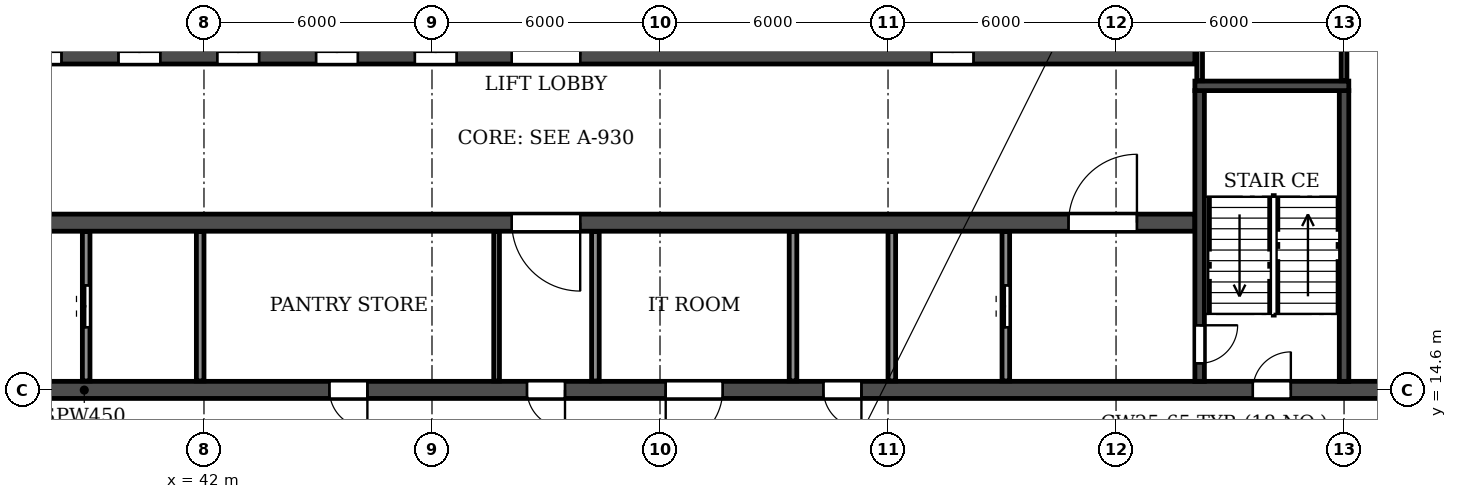
"""IFC4 building model, lengths in metres.
Left out: names, types, materials, properties, quantities, classifications, styles, units other than length and angle.
Written with IfcOpenShell. Run it as: python <this file> out.ifc"""

import sys

from ifc_helpers import new_model, si_unit, direction, frame, frame_2d, origin, place, context, subcontext, project, spatial, rectangle, extrude, element, fill, save


model = new_model("IFC4")
c1 = context("Model", 3, precision=1e-05, world=origin(), true_north=direction((0.0, 1.0)))
c2 = subcontext(c1, "Body", "Model", "MODEL_VIEW")
j1 = project(units=[si_unit("LENGTHUNIT", "METRE"), si_unit("PLANEANGLEUNIT", "RADIAN")], contexts=[c1])
p1 = place(None, origin())
s1 = spatial("IfcSite", under=j1, at=p1, CompositionType="ELEMENT")
p2 = place(p1, origin())
s2 = spatial("IfcBuilding", under=s1, at=p2, CompositionType="ELEMENT")
p3 = place(p2, frame((0.0, 0.0, 162.0)))
s3 = spatial("IfcBuildingStorey", under=s2, at=p3, CompositionType="ELEMENT", Elevation=162.0)
p4 = place(p3, frame((18.2, 14.6, 0.0), z_axis=(0.0, 0.0, 1.0), x_axis=(1.0, 0.0, 0.0)))
e1 = element("IfcWall", 1, at=p4, inside=s3, PredefinedType="SOLIDWALL", context=c2, shape_type="SweptSolid", body=[
    extrude(rectangle(XDim=65.6, YDim=0.45, at=frame_2d((32.8, 0.0))), origin(), (0.0, 0.0, 1.0), 2.95),
])
p5 = place(p4, frame((0.7, 0.0, 0.0)))
e2 = element("IfcOpeningElement", 2, at=p5, cuts=e1, PredefinedType="OPENING", context=c2, shape_type="SweptSolid", body=[
    extrude(rectangle(XDim=1.0, YDim=2.1, at=frame_2d((0.5, 1.05))), frame((0.0, 0.235, 0.0), z_axis=(0.0, -1.0, 0.0), x_axis=(1.0, 0.0, 0.0)), (0.0, 0.0, 1.0), 0.47),
])
p6 = place(p4, frame((8.6, 0.0, 0.0)))
e3 = element("IfcOpeningElement", 3, at=p6, cuts=e1, PredefinedType="OPENING", context=c2, shape_type="SweptSolid", body=[
    extrude(rectangle(XDim=1.0, YDim=2.1, at=frame_2d((0.5, 1.05))), frame((0.0, 0.235, 0.0), z_axis=(0.0, -1.0, 0.0), x_axis=(1.0, 0.0, 0.0)), (0.0, 0.0, 1.0), 0.47),
])
p7 = place(p4, frame((13.2, 0.0, 0.0)))
e4 = element("IfcOpeningElement", 4, at=p7, cuts=e1, PredefinedType="OPENING", context=c2, shape_type="SweptSolid", body=[
    extrude(rectangle(XDim=1.0, YDim=2.1, at=frame_2d((0.5, 1.05))), frame((0.0, 0.235, 0.0), z_axis=(0.0, -1.0, 0.0), x_axis=(1.0, 0.0, 0.0)), (0.0, 0.0, 1.0), 0.47),
])
p8 = place(p4, frame((27.1, 0.0, 0.0)))
e5 = element("IfcOpeningElement", 5, at=p8, cuts=e1, PredefinedType="OPENING", context=c2, shape_type="SweptSolid", body=[
    extrude(rectangle(XDim=1.0, YDim=2.1, at=frame_2d((0.5, 1.05))), frame((0.0, 0.235, 0.0), z_axis=(0.0, -1.0, 0.0), x_axis=(1.0, 0.0, 0.0)), (0.0, 0.0, 1.0), 0.47),
])
p9 = place(p4, frame((32.3, 0.0, 0.0)))
e6 = element("IfcOpeningElement", 6, at=p9, cuts=e1, PredefinedType="OPENING", context=c2, shape_type="SweptSolid", body=[
    extrude(rectangle(XDim=1.0, YDim=2.1, at=frame_2d((0.5, 1.05))), frame((0.0, 0.235, 0.0), z_axis=(0.0, -1.0, 0.0), x_axis=(1.0, 0.0, 0.0)), (0.0, 0.0, 1.0), 0.47),
])
p10 = place(p4, frame((35.95, 0.0, 0.0)))
e7 = element("IfcOpeningElement", 7, at=p10, cuts=e1, PredefinedType="OPENING", context=c2, shape_type="SweptSolid", body=[
    extrude(rectangle(XDim=1.5, YDim=2.1, at=frame_2d((0.75, 1.05))), frame((0.0, 0.235, 0.0), z_axis=(0.0, -1.0, 0.0), x_axis=(1.0, 0.0, 0.0)), (0.0, 0.0, 1.0), 0.47),
])
p11 = place(p4, frame((40.1, 0.0, 0.0)))
e8 = element("IfcOpeningElement", 8, at=p11, cuts=e1, PredefinedType="OPENING", context=c2, shape_type="SweptSolid", body=[
    extrude(rectangle(XDim=1.0, YDim=2.1, at=frame_2d((0.5, 1.05))), frame((0.0, 0.235, 0.0), z_axis=(0.0, -1.0, 0.0), x_axis=(1.0, 0.0, 0.0)), (0.0, 0.0, 1.0), 0.47),
])
p12 = place(p4, frame((51.4, 0.0, 0.0)))
e9 = element("IfcOpeningElement", 9, at=p12, cuts=e1, PredefinedType="OPENING", context=c2, shape_type="SweptSolid", body=[
    extrude(rectangle(XDim=1.0, YDim=2.1, at=frame_2d((0.5, 1.05))), frame((0.0, 0.235, 0.0), z_axis=(0.0, -1.0, 0.0), x_axis=(1.0, 0.0, 0.0)), (0.0, 0.0, 1.0), 0.47),
])
p13 = place(p4, frame((56.0, 0.0, 0.0)))
e10 = element("IfcOpeningElement", 10, at=p13, cuts=e1, PredefinedType="OPENING", context=c2, shape_type="SweptSolid", body=[
    extrude(rectangle(XDim=1.0, YDim=2.1, at=frame_2d((0.5, 1.05))), frame((0.0, 0.235, 0.0), z_axis=(0.0, -1.0, 0.0), x_axis=(1.0, 0.0, 0.0)), (0.0, 0.0, 1.0), 0.47),
])
p14 = place(p4, frame((63.9, 0.0, 0.0)))
e11 = element("IfcOpeningElement", 11, at=p14, cuts=e1, PredefinedType="OPENING", context=c2, shape_type="SweptSolid", body=[
    extrude(rectangle(XDim=1.0, YDim=2.1, at=frame_2d((0.5, 1.05))), frame((0.0, 0.235, 0.0), z_axis=(0.0, -1.0, 0.0), x_axis=(1.0, 0.0, 0.0)), (0.0, 0.0, 1.0), 0.47),
])
p15 = place(p3, frame((33.925, 19.0, 0.0), z_axis=(0.0, 0.0, 1.0), x_axis=(1.0, 0.0, 0.0)))
e12 = element("IfcWall", 12, at=p15, inside=s3, PredefinedType="SOLIDWALL", context=c2, shape_type="SweptSolid", body=[
    extrude(rectangle(XDim=34.15, YDim=0.45, at=frame_2d((17.075, 0.0))), origin(), (0.0, 0.0, 1.0), 2.95),
])
p16 = place(p15, frame((16.175, 0.0, 0.0)))
e13 = element("IfcOpeningElement", 13, at=p16, cuts=e12, PredefinedType="OPENING", context=c2, shape_type="SweptSolid", body=[
    extrude(rectangle(XDim=1.8, YDim=2.1, at=frame_2d((0.9, 1.05))), frame((0.0, 0.235, 0.0), z_axis=(0.0, -1.0, 0.0), x_axis=(1.0, 0.0, 0.0)), (0.0, 0.0, 1.0), 0.47),
])
p17 = place(p15, frame((1.525, 0.0, 0.0)))
e14 = element("IfcOpeningElement", 14, at=p17, cuts=e12, PredefinedType="OPENING", context=c2, shape_type="SweptSolid", body=[
    extrude(rectangle(XDim=1.8, YDim=2.1, at=frame_2d((0.9, 1.05))), frame((0.0, 0.235, 0.0), z_axis=(0.0, -1.0, 0.0), x_axis=(1.0, 0.0, 0.0)), (0.0, 0.0, 1.0), 0.47),
])
p18 = place(p15, frame((30.825, 0.0, 0.0)))
e15 = element("IfcOpeningElement", 15, at=p18, cuts=e12, PredefinedType="OPENING", context=c2, shape_type="SweptSolid", body=[
    extrude(rectangle(XDim=1.8, YDim=2.1, at=frame_2d((0.9, 1.05))), frame((0.0, 0.235, 0.0), z_axis=(0.0, -1.0, 0.0), x_axis=(1.0, 0.0, 0.0)), (0.0, 0.0, 1.0), 0.47),
])
p19 = place(p3, frame((33.925, 23.4, 0.0), z_axis=(0.0, 0.0, 1.0), x_axis=(1.0, 0.0, 0.0)))
e16 = element("IfcWall", 16, at=p19, inside=s3, PredefinedType="SOLIDWALL", context=c2, shape_type="SweptSolid", body=[
    extrude(rectangle(XDim=34.15, YDim=0.45, at=frame_2d((17.075, 0.0))), origin(), (0.0, 0.0, 1.0), 2.95),
])
p20 = place(p19, frame((16.175, 0.0, 0.0)))
e17 = element("IfcOpeningElement", 17, at=p20, cuts=e16, PredefinedType="OPENING", context=c2, shape_type="SweptSolid", body=[
    extrude(rectangle(XDim=1.8, YDim=2.1, at=frame_2d((0.9, 1.05))), frame((0.0, 0.235, 0.0), z_axis=(0.0, -1.0, 0.0), x_axis=(1.0, 0.0, 0.0)), (0.0, 0.0, 1.0), 0.47),
])
p21 = place(p19, frame((0.625, 0.0, 0.0)))
e18 = element("IfcOpeningElement", 18, at=p21, cuts=e16, PredefinedType="OPENING", context=c2, shape_type="SweptSolid", body=[
    extrude(rectangle(XDim=1.1, YDim=2.1, at=frame_2d((0.55, 1.05))), frame((0.0, 0.235, 0.0), z_axis=(0.0, -1.0, 0.0), x_axis=(1.0, 0.0, 0.0)), (0.0, 0.0, 1.0), 0.47),
])
p22 = place(p19, frame((3.225, 0.0, 0.0)))
e19 = element("IfcOpeningElement", 19, at=p22, cuts=e16, PredefinedType="OPENING", context=c2, shape_type="SweptSolid", body=[
    extrude(rectangle(XDim=1.1, YDim=2.1, at=frame_2d((0.55, 1.05))), frame((0.0, 0.235, 0.0), z_axis=(0.0, -1.0, 0.0), x_axis=(1.0, 0.0, 0.0)), (0.0, 0.0, 1.0), 0.47),
])
p23 = place(p19, frame((5.825, 0.0, 0.0)))
e20 = element("IfcOpeningElement", 20, at=p23, cuts=e16, PredefinedType="OPENING", context=c2, shape_type="SweptSolid", body=[
    extrude(rectangle(XDim=1.1, YDim=2.1, at=frame_2d((0.55, 1.05))), frame((0.0, 0.235, 0.0), z_axis=(0.0, -1.0, 0.0), x_axis=(1.0, 0.0, 0.0)), (0.0, 0.0, 1.0), 0.47),
])
p24 = place(p19, frame((8.425, 0.0, 0.0)))
e21 = element("IfcOpeningElement", 21, at=p24, cuts=e16, PredefinedType="OPENING", context=c2, shape_type="SweptSolid", body=[
    extrude(rectangle(XDim=1.1, YDim=2.1, at=frame_2d((0.55, 1.05))), frame((0.0, 0.235, 0.0), z_axis=(0.0, -1.0, 0.0), x_axis=(1.0, 0.0, 0.0)), (0.0, 0.0, 1.0), 0.47),
])
p25 = place(p19, frame((11.025, 0.0, 0.0)))
e22 = element("IfcOpeningElement", 22, at=p25, cuts=e16, PredefinedType="OPENING", context=c2, shape_type="SweptSolid", body=[
    extrude(rectangle(XDim=1.1, YDim=2.1, at=frame_2d((0.55, 1.05))), frame((0.0, 0.235, 0.0), z_axis=(0.0, -1.0, 0.0), x_axis=(1.0, 0.0, 0.0)), (0.0, 0.0, 1.0), 0.47),
])
p26 = place(p19, frame((13.625, 0.0, 0.0)))
e23 = element("IfcOpeningElement", 23, at=p26, cuts=e16, PredefinedType="OPENING", context=c2, shape_type="SweptSolid", body=[
    extrude(rectangle(XDim=1.1, YDim=2.1, at=frame_2d((0.55, 1.05))), frame((0.0, 0.235, 0.0), z_axis=(0.0, -1.0, 0.0), x_axis=(1.0, 0.0, 0.0)), (0.0, 0.0, 1.0), 0.47),
])
p27 = place(p19, frame((27.225, 0.0, 0.0)))
e24 = element("IfcOpeningElement", 24, at=p27, cuts=e16, PredefinedType="OPENING", context=c2, shape_type="SweptSolid", body=[
    extrude(rectangle(XDim=1.1, YDim=2.1, at=frame_2d((0.55, 1.05))), frame((0.0, 0.235, 0.0), z_axis=(0.0, -1.0, 0.0), x_axis=(1.0, 0.0, 0.0)), (0.0, 0.0, 1.0), 0.47),
])
p28 = place(p3, frame((68.2, 14.825, 0.0), z_axis=(0.0, 0.0, 1.0), x_axis=(0.0, 1.0, 0.0)))
e25 = element("IfcWall", 25, at=p28, inside=s3, PredefinedType="SOLIDWALL", context=c2, shape_type="SweptSolid", body=[
    extrude(rectangle(XDim=7.65, YDim=0.25, at=frame_2d((3.825, 0.0))), origin(), (0.0, 0.0, 1.0), 2.95),
])
p29 = place(p28, frame((0.475, 0.0, 0.0)))
e26 = element("IfcOpeningElement", 26, at=p29, cuts=e25, PredefinedType="OPENING", context=c2, shape_type="SweptSolid", body=[
    extrude(rectangle(XDim=1.0, YDim=2.1, at=frame_2d((0.5, 1.05))), frame((0.0, 0.135, 0.0), z_axis=(0.0, -1.0, 0.0), x_axis=(1.0, 0.0, 0.0)), (0.0, 0.0, 1.0), 0.27),
])
p30 = place(p3, frame((72.0, 14.825, 0.0), z_axis=(0.0, 0.0, 1.0), x_axis=(0.0, 1.0, 0.0)))
e27 = element("IfcWall", 27, at=p30, inside=s3, PredefinedType="SOLIDWALL", context=c2, shape_type="SweptSolid", body=[
    extrude(rectangle(XDim=7.65, YDim=0.25, at=frame_2d((3.825, 0.0))), origin(), (0.0, 0.0, 1.0), 2.95),
])
p31 = place(p3, frame((68.075, 22.6, 0.0), z_axis=(0.0, 0.0, 1.0), x_axis=(1.0, 0.0, 0.0)))
e28 = element("IfcWall", 28, at=p31, inside=s3, PredefinedType="SOLIDWALL", context=c2, shape_type="SweptSolid", body=[
    extrude(rectangle(XDim=4.05, YDim=0.25, at=frame_2d((2.025, 0.0))), origin(), (0.0, 0.0, 1.0), 2.95),
])
p32 = place(p3, frame((49.7, 14.835, 0.0), z_axis=(0.0, 0.0, 1.0), x_axis=(0.0, 1.0, 0.0)))
e29 = element("IfcWall", 29, at=p32, inside=s3, PredefinedType="PARTITIONING", context=c2, shape_type="SweptSolid", body=[
    extrude(rectangle(XDim=3.93, YDim=0.15, at=frame_2d((1.965, 0.0))), origin(), (0.0, 0.0, 1.0), 2.95),
])
for number, where, z_axis, x_axis in (
    (30, (52.3, 14.835, 0.0), (0.0, 0.0, 1.0), (0.0, 1.0, 0.0)),
    (31, (57.5, 14.835, 0.0), (0.0, 0.0, 1.0), (0.0, 1.0, 0.0)),
):
    element("IfcWall", number, at=place(p3, frame(where, z_axis=z_axis, x_axis=x_axis)), inside=s3, PredefinedType="PARTITIONING", context=c2, shape_type="SweptSolid", body=[
        extrude(rectangle(XDim=3.93, YDim=0.2, at=frame_2d((1.965, 0.0))), origin(), (0.0, 0.0, 1.0), 2.95),
    ])
for number, where, z_axis, x_axis in (
    (32, (68.2, 22.735, 0.0), (0.0, 0.0, 1.0), (0.0, 1.0, 0.0)),
    (33, (72.0, 22.735, 0.0), (0.0, 0.0, 1.0), (0.0, 1.0, 0.0)),
):
    element("IfcWall", number, at=place(p3, frame(where, z_axis=z_axis, x_axis=x_axis)), inside=s3, PredefinedType="PARTITIONING", context=c2, shape_type="SweptSolid", body=[
        extrude(rectangle(XDim=4.83, YDim=0.15, at=frame_2d((2.415, 0.0))), origin(), (0.0, 0.0, 1.0), 2.95),
    ])
p33 = place(p3, frame((38.9, 14.835, 0.0), z_axis=(0.0, 0.0, 1.0), x_axis=(0.0, 1.0, 0.0)))
e34 = element("IfcWall", 34, at=p33, inside=s3, PredefinedType="PARTITIONING", context=c2, shape_type="SweptSolid", body=[
    extrude(rectangle(XDim=3.93, YDim=0.2, at=frame_2d((1.965, 0.0))), origin(), (0.0, 0.0, 1.0), 2.95),
])
p34 = place(p33, frame((1.415, 0.0, 0.0)))
e35 = element("IfcOpeningElement", 35, at=p34, cuts=e34, PredefinedType="OPENING", context=c2, shape_type="SweptSolid", body=[
    extrude(rectangle(XDim=1.1, YDim=2.1, at=frame_2d((0.55, 1.05))), frame((0.0, 0.11, 0.0), z_axis=(0.0, -1.0, 0.0), x_axis=(1.0, 0.0, 0.0)), (0.0, 0.0, 1.0), 0.22),
])
for number, where, z_axis, x_axis in (
    (36, (41.9, 14.835, 0.0), (0.0, 0.0, 1.0), (0.0, 1.0, 0.0)),
    (37, (60.1, 14.835, 0.0), (0.0, 0.0, 1.0), (0.0, 1.0, 0.0)),
):
    element("IfcWall", number, at=place(p3, frame(where, z_axis=z_axis, x_axis=x_axis)), inside=s3, PredefinedType="PARTITIONING", context=c2, shape_type="SweptSolid", body=[
        extrude(rectangle(XDim=3.93, YDim=0.2, at=frame_2d((1.965, 0.0))), origin(), (0.0, 0.0, 1.0), 2.95),
    ])
p35 = place(p3, frame((63.1, 14.835, 0.0), z_axis=(0.0, 0.0, 1.0), x_axis=(0.0, 1.0, 0.0)))
e38 = element("IfcWall", 38, at=p35, inside=s3, PredefinedType="PARTITIONING", context=c2, shape_type="SweptSolid", body=[
    extrude(rectangle(XDim=3.93, YDim=0.2, at=frame_2d((1.965, 0.0))), origin(), (0.0, 0.0, 1.0), 2.95),
])
p36 = place(p35, frame((1.415, 0.0, 0.0)))
e39 = element("IfcOpeningElement", 39, at=p36, cuts=e38, PredefinedType="OPENING", context=c2, shape_type="SweptSolid", body=[
    extrude(rectangle(XDim=1.1, YDim=2.1, at=frame_2d((0.55, 1.05))), frame((0.0, 0.11, 0.0), z_axis=(0.0, -1.0, 0.0), x_axis=(1.0, 0.0, 0.0)), (0.0, 0.0, 1.0), 0.22),
])
p37 = place(p8, frame((1.0, 0.0, 0.0), z_axis=(0.0, 0.0, 1.0), x_axis=(-1.0, 0.0, 0.0)))
e40 = element("IfcDoor", 40, at=p37, inside=s3, OperationType="SINGLE_SWING_LEFT", PredefinedType="DOOR", context=c2, shape_type="SweptSolid", body=[
    extrude(rectangle(XDim=1.0, YDim=2.1, at=frame_2d((0.5, 1.05))), frame((0.0, 0.025, 0.0), z_axis=(0.0, -1.0, 0.0), x_axis=(1.0, 0.0, 0.0)), (0.0, 0.0, 1.0), 0.05),
])
fill(e5, e40)
p38 = place(p9, frame((1.0, 0.0, 0.0), z_axis=(0.0, 0.0, 1.0), x_axis=(-1.0, 0.0, 0.0)))
e41 = element("IfcDoor", 41, at=p38, inside=s3, OperationType="SINGLE_SWING_LEFT", PredefinedType="DOOR", context=c2, shape_type="SweptSolid", body=[
    extrude(rectangle(XDim=1.0, YDim=2.1, at=frame_2d((0.5, 1.05))), frame((0.0, 0.025, 0.0), z_axis=(0.0, -1.0, 0.0), x_axis=(1.0, 0.0, 0.0)), (0.0, 0.0, 1.0), 0.05),
])
fill(e6, e41)
p39 = place(p10, frame((1.5, 0.0, 0.0), z_axis=(0.0, 0.0, 1.0), x_axis=(-1.0, 0.0, 0.0)))
e42 = element("IfcDoor", 42, at=p39, inside=s3, OperationType="DOUBLE_DOOR_SINGLE_SWING", PredefinedType="DOOR", context=c2, shape_type="SweptSolid", body=[
    extrude(rectangle(XDim=1.5, YDim=2.1, at=frame_2d((0.75, 1.05))), frame((0.0, 0.025, 0.0), z_axis=(0.0, -1.0, 0.0), x_axis=(1.0, 0.0, 0.0)), (0.0, 0.0, 1.0), 0.05),
])
fill(e7, e42)
p40 = place(p11, frame((1.0, 0.0, 0.0), z_axis=(0.0, 0.0, 1.0), x_axis=(-1.0, 0.0, 0.0)))
e43 = element("IfcDoor", 43, at=p40, inside=s3, OperationType="SINGLE_SWING_LEFT", PredefinedType="DOOR", context=c2, shape_type="SweptSolid", body=[
    extrude(rectangle(XDim=1.0, YDim=2.1, at=frame_2d((0.5, 1.05))), frame((0.0, 0.025, 0.0), z_axis=(0.0, -1.0, 0.0), x_axis=(1.0, 0.0, 0.0)), (0.0, 0.0, 1.0), 0.05),
])
fill(e8, e43)
p41 = place(p12, origin())
e44 = element("IfcDoor", 44, at=p41, inside=s3, OperationType="SINGLE_SWING_RIGHT", PredefinedType="DOOR", context=c2, shape_type="SweptSolid", body=[
    extrude(rectangle(XDim=1.0, YDim=2.1, at=frame_2d((0.5, 1.05))), frame((0.0, 0.025, 0.0), z_axis=(0.0, -1.0, 0.0), x_axis=(1.0, 0.0, 0.0)), (0.0, 0.0, 1.0), 0.05),
])
fill(e9, e44)
p42 = place(p36, origin())
e45 = element("IfcDoor", 45, at=p42, inside=s3, OperationType="DOUBLE_DOOR_SLIDING", PredefinedType="DOOR", context=c2, shape_type="SweptSolid", body=[
    extrude(rectangle(XDim=1.1, YDim=2.1, at=frame_2d((0.55, 1.05))), frame((0.0, 0.025, 0.0), z_axis=(0.0, -1.0, 0.0), x_axis=(1.0, 0.0, 0.0)), (0.0, 0.0, 1.0), 0.05),
])
fill(e39, e45)
p43 = place(p29, frame((1.0, 0.0, 0.0), z_axis=(0.0, 0.0, 1.0), x_axis=(-1.0, 0.0, 0.0)))
e46 = element("IfcDoor", 46, at=p43, inside=s3, OperationType="SINGLE_SWING_LEFT", PredefinedType="DOOR", context=c2, shape_type="SweptSolid", body=[
    extrude(rectangle(XDim=1.0, YDim=2.1, at=frame_2d((0.5, 1.05))), frame((0.0, 0.025, 0.0), z_axis=(0.0, -1.0, 0.0), x_axis=(1.0, 0.0, 0.0)), (0.0, 0.0, 1.0), 0.05),
])
fill(e26, e46)
p44 = place(p34, origin())
e47 = element("IfcDoor", 47, at=p44, inside=s3, OperationType="DOUBLE_DOOR_SLIDING", PredefinedType="DOOR", context=c2, shape_type="SweptSolid", body=[
    extrude(rectangle(XDim=1.1, YDim=2.1, at=frame_2d((0.55, 1.05))), frame((0.0, 0.025, 0.0), z_axis=(0.0, -1.0, 0.0), x_axis=(1.0, 0.0, 0.0)), (0.0, 0.0, 1.0), 0.05),
])
fill(e35, e47)
p45 = place(p20, origin())
e48 = element("IfcDoor", 48, at=p45, inside=s3, OperationType="DOUBLE_DOOR_SINGLE_SWING", PredefinedType="DOOR", context=c2, shape_type="SweptSolid", body=[
    extrude(rectangle(XDim=1.8, YDim=2.1, at=frame_2d((0.9, 1.05))), frame((0.0, 0.025, 0.0), z_axis=(0.0, -1.0, 0.0), x_axis=(1.0, 0.0, 0.0)), (0.0, 0.0, 1.0), 0.05),
])
fill(e17, e48)
p46 = place(p16, frame((1.8, 0.0, 0.0), z_axis=(0.0, 0.0, 1.0), x_axis=(-1.0, 0.0, 0.0)))
e49 = element("IfcDoor", 49, at=p46, inside=s3, OperationType="DOUBLE_DOOR_SINGLE_SWING", PredefinedType="DOOR", context=c2, shape_type="SweptSolid", body=[
    extrude(rectangle(XDim=1.8, YDim=2.1, at=frame_2d((0.9, 1.05))), frame((0.0, 0.025, 0.0), z_axis=(0.0, -1.0, 0.0), x_axis=(1.0, 0.0, 0.0)), (0.0, 0.0, 1.0), 0.05),
])
fill(e13, e49)
p47 = place(p22, origin())
e50 = element("IfcDoor", 50, at=p47, inside=s3, OperationType="DOUBLE_DOOR_SLIDING", PredefinedType="DOOR", context=c2, shape_type="SweptSolid", body=[
    extrude(rectangle(XDim=1.1, YDim=2.1, at=frame_2d((0.55, 1.05))), frame((0.0, 0.025, 0.0), z_axis=(0.0, -1.0, 0.0), x_axis=(1.0, 0.0, 0.0)), (0.0, 0.0, 1.0), 0.05),
])
fill(e19, e50)
p48 = place(p23, origin())
e51 = element("IfcDoor", 51, at=p48, inside=s3, OperationType="DOUBLE_DOOR_SLIDING", PredefinedType="DOOR", context=c2, shape_type="SweptSolid", body=[
    extrude(rectangle(XDim=1.1, YDim=2.1, at=frame_2d((0.55, 1.05))), frame((0.0, 0.025, 0.0), z_axis=(0.0, -1.0, 0.0), x_axis=(1.0, 0.0, 0.0)), (0.0, 0.0, 1.0), 0.05),
])
fill(e20, e51)
p49 = place(p24, origin())
e52 = element("IfcDoor", 52, at=p49, inside=s3, OperationType="DOUBLE_DOOR_SLIDING", PredefinedType="DOOR", context=c2, shape_type="SweptSolid", body=[
    extrude(rectangle(XDim=1.1, YDim=2.1, at=frame_2d((0.55, 1.05))), frame((0.0, 0.025, 0.0), z_axis=(0.0, -1.0, 0.0), x_axis=(1.0, 0.0, 0.0)), (0.0, 0.0, 1.0), 0.05),
])
fill(e21, e52)
p50 = place(p25, origin())
e53 = element("IfcDoor", 53, at=p50, inside=s3, OperationType="DOUBLE_DOOR_SLIDING", PredefinedType="DOOR", context=c2, shape_type="SweptSolid", body=[
    extrude(rectangle(XDim=1.1, YDim=2.1, at=frame_2d((0.55, 1.05))), frame((0.0, 0.025, 0.0), z_axis=(0.0, -1.0, 0.0), x_axis=(1.0, 0.0, 0.0)), (0.0, 0.0, 1.0), 0.05),
])
fill(e22, e53)
p51 = place(p26, origin())
e54 = element("IfcDoor", 54, at=p51, inside=s3, OperationType="DOUBLE_DOOR_SLIDING", PredefinedType="DOOR", context=c2, shape_type="SweptSolid", body=[
    extrude(rectangle(XDim=1.1, YDim=2.1, at=frame_2d((0.55, 1.05))), frame((0.0, 0.025, 0.0), z_axis=(0.0, -1.0, 0.0), x_axis=(1.0, 0.0, 0.0)), (0.0, 0.0, 1.0), 0.05),
])
fill(e23, e54)
p52 = place(p27, origin())
e55 = element("IfcDoor", 55, at=p52, inside=s3, OperationType="DOUBLE_DOOR_SLIDING", PredefinedType="DOOR", context=c2, shape_type="SweptSolid", body=[
    extrude(rectangle(XDim=1.1, YDim=2.1, at=frame_2d((0.55, 1.05))), frame((0.0, 0.025, 0.0), z_axis=(0.0, -1.0, 0.0), x_axis=(1.0, 0.0, 0.0)), (0.0, 0.0, 1.0), 0.05),
])
fill(e24, e55)
p53 = place(p18, origin())
e56 = element("IfcDoor", 56, at=p53, inside=s3, OperationType="DOUBLE_DOOR_SINGLE_SWING", PredefinedType="DOOR", context=c2, shape_type="SweptSolid", body=[
    extrude(rectangle(XDim=1.8, YDim=2.1, at=frame_2d((0.9, 1.05))), frame((0.0, 0.025, 0.0), z_axis=(0.0, -1.0, 0.0), x_axis=(1.0, 0.0, 0.0)), (0.0, 0.0, 1.0), 0.05),
])
fill(e15, e56)
save(model, sys.argv[1])
